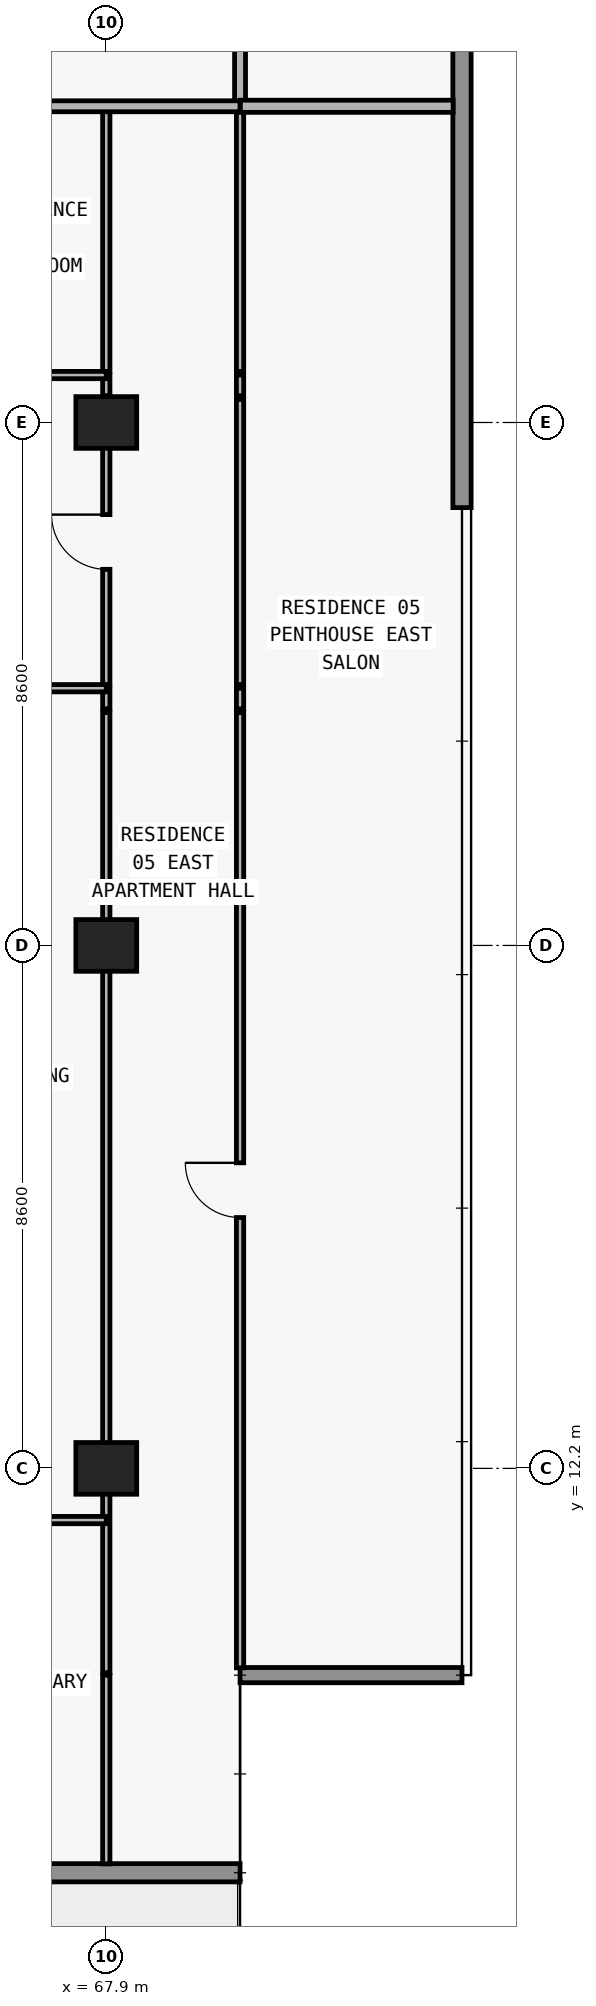
"""IFC4 building model, lengths in metres.
Left out: names, types, materials, properties, quantities, classifications, styles, units other than length and angle.
Written with IfcOpenShell. Run it as: python <this file> out.ifc"""

import sys

from ifc_helpers import new_model, si_unit, direction, frame, frame_2d, origin, origin_2d, place, context, subcontext, project, spatial, rectangle, extrude, element, fill, save


model = new_model("IFC4")
c1 = context("Model", 3, precision=1e-05, world=origin(), true_north=direction((0.0, 1.0)))
c2 = subcontext(c1, "Body", "Model", "MODEL_VIEW")
j1 = project(units=[si_unit("LENGTHUNIT", "METRE"), si_unit("PLANEANGLEUNIT", "RADIAN")], contexts=[c1])
p1 = place(None, origin())
s1 = spatial("IfcSite", under=j1, at=p1, CompositionType="ELEMENT")
p2 = place(p1, origin())
s2 = spatial("IfcBuilding", under=s1, at=p2, CompositionType="ELEMENT")
p3 = place(p2, frame((0.0, 0.0, 102.6)))
s3 = spatial("IfcBuildingStorey", under=s2, at=p3, CompositionType="ELEMENT", Elevation=102.6)
for number, where, z_axis, x_axis in (
    (1, (67.9, 12.2, 0.0), (0.0, 0.0, 1.0), (1.0, 0.0, 0.0)),
    (2, (67.9, 20.8, 0.0), (0.0, 0.0, 1.0), (1.0, 0.0, 0.0)),
    (3, (67.9, 29.4, 0.0), (0.0, 0.0, 1.0), (1.0, 0.0, 0.0)),
):
    element("IfcColumn", number, at=place(p3, frame(where, z_axis=z_axis, x_axis=x_axis)), inside=s3, PredefinedType="COLUMN", context=c2, shape_type="SweptSolid", body=[
        extrude(rectangle(XDim=1.0, YDim=0.85, at=origin_2d()), origin(), (0.0, 0.0, 1.0), 3.05),
    ])
p4 = place(p3, frame((70.1, 5.55, 0.0), z_axis=(0.0, 0.0, 1.0), x_axis=(-1.0, 0.0, 0.0)))
e4 = element("IfcWall", 4, at=p4, inside=s3, PredefinedType="STANDARD", context=c2, shape_type="SweptSolid", body=[
    extrude(rectangle(XDim=62.4, YDim=0.3, at=frame_2d((31.2, 0.0))), origin(), (0.0, 0.0, 1.0), 3.05),
])
p5 = place(p4, frame((57.226, 0.0, 0.0)))
e5 = element("IfcOpeningElement", 5, at=p5, cuts=e4, PredefinedType="OPENING", context=c2, shape_type="SweptSolid", body=[
    extrude(rectangle(XDim=2.0, YDim=2.3, at=frame_2d((1.0, 1.15))), frame((0.0, 0.16, 0.0), z_axis=(0.0, -1.0, 0.0), x_axis=(1.0, 0.0, 0.0)), (0.0, 0.0, 1.0), 0.32),
])
p6 = place(p4, frame((52.926, 0.0, 0.85)))
e6 = element("IfcOpeningElement", 6, at=p6, cuts=e4, PredefinedType="OPENING", context=c2, shape_type="SweptSolid", body=[
    extrude(rectangle(XDim=2.2, YDim=1.55, at=frame_2d((1.1, 0.775))), frame((0.0, 0.16, 0.0), z_axis=(0.0, -1.0, 0.0), x_axis=(1.0, 0.0, 0.0)), (0.0, 0.0, 1.0), 0.32),
])
p7 = place(p4, frame((48.49, 0.0, 0.0)))
e7 = element("IfcOpeningElement", 7, at=p7, cuts=e4, PredefinedType="OPENING", context=c2, shape_type="SweptSolid", body=[
    extrude(rectangle(XDim=2.0, YDim=2.3, at=frame_2d((1.0, 1.15))), frame((0.0, 0.16, 0.0), z_axis=(0.0, -1.0, 0.0), x_axis=(1.0, 0.0, 0.0)), (0.0, 0.0, 1.0), 0.32),
])
p8 = place(p4, frame((44.39, 0.0, 0.85)))
e8 = element("IfcOpeningElement", 8, at=p8, cuts=e4, PredefinedType="OPENING", context=c2, shape_type="SweptSolid", body=[
    extrude(rectangle(XDim=1.8, YDim=1.55, at=frame_2d((0.9, 0.775))), frame((0.0, 0.16, 0.0), z_axis=(0.0, -1.0, 0.0), x_axis=(1.0, 0.0, 0.0)), (0.0, 0.0, 1.0), 0.32),
])
p9 = place(p4, frame((40.49, 0.0, 0.0)))
e9 = element("IfcOpeningElement", 9, at=p9, cuts=e4, PredefinedType="OPENING", context=c2, shape_type="SweptSolid", body=[
    extrude(rectangle(XDim=2.0, YDim=2.3, at=frame_2d((1.0, 1.15))), frame((0.0, 0.16, 0.0), z_axis=(0.0, -1.0, 0.0), x_axis=(1.0, 0.0, 0.0)), (0.0, 0.0, 1.0), 0.32),
])
p10 = place(p4, frame((35.81, 0.0, 0.65)))
e10 = element("IfcOpeningElement", 10, at=p10, cuts=e4, PredefinedType="OPENING", context=c2, shape_type="SweptSolid", body=[
    extrude(rectangle(XDim=2.6, YDim=1.85, at=frame_2d((1.3, 0.925))), frame((0.0, 0.16, 0.0), z_axis=(0.0, -1.0, 0.0), x_axis=(1.0, 0.0, 0.0)), (0.0, 0.0, 1.0), 0.32),
])
p11 = place(p4, frame((30.1, 0.0, 0.85)))
e11 = element("IfcOpeningElement", 11, at=p11, cuts=e4, PredefinedType="OPENING", context=c2, shape_type="SweptSolid", body=[
    extrude(rectangle(XDim=2.2, YDim=1.55, at=frame_2d((1.1, 0.775))), frame((0.0, 0.16, 0.0), z_axis=(0.0, -1.0, 0.0), x_axis=(1.0, 0.0, 0.0)), (0.0, 0.0, 1.0), 0.32),
])
p12 = place(p4, frame((22.1, 0.0, 0.85)))
e12 = element("IfcOpeningElement", 12, at=p12, cuts=e4, PredefinedType="OPENING", context=c2, shape_type="SweptSolid", body=[
    extrude(rectangle(XDim=2.2, YDim=1.55, at=frame_2d((1.1, 0.775))), frame((0.0, 0.16, 0.0), z_axis=(0.0, -1.0, 0.0), x_axis=(1.0, 0.0, 0.0)), (0.0, 0.0, 1.0), 0.32),
])
p13 = place(p4, frame((15.69, 0.0, 0.0)))
e13 = element("IfcOpeningElement", 13, at=p13, cuts=e4, PredefinedType="OPENING", context=c2, shape_type="SweptSolid", body=[
    extrude(rectangle(XDim=2.0, YDim=2.3, at=frame_2d((1.0, 1.15))), frame((0.0, 0.16, 0.0), z_axis=(0.0, -1.0, 0.0), x_axis=(1.0, 0.0, 0.0)), (0.0, 0.0, 1.0), 0.32),
])
p14 = place(p4, frame((11.59, 0.0, 0.85)))
e14 = element("IfcOpeningElement", 14, at=p14, cuts=e4, PredefinedType="OPENING", context=c2, shape_type="SweptSolid", body=[
    extrude(rectangle(XDim=1.8, YDim=1.55, at=frame_2d((0.9, 0.775))), frame((0.0, 0.16, 0.0), z_axis=(0.0, -1.0, 0.0), x_axis=(1.0, 0.0, 0.0)), (0.0, 0.0, 1.0), 0.32),
])
p15 = place(p4, frame((7.626, 0.0, 0.0)))
e15 = element("IfcOpeningElement", 15, at=p15, cuts=e4, PredefinedType="OPENING", context=c2, shape_type="SweptSolid", body=[
    extrude(rectangle(XDim=2.0, YDim=2.3, at=frame_2d((1.0, 1.15))), frame((0.0, 0.16, 0.0), z_axis=(0.0, -1.0, 0.0), x_axis=(1.0, 0.0, 0.0)), (0.0, 0.0, 1.0), 0.32),
])
p16 = place(p4, frame((3.326, 0.0, 0.85)))
e16 = element("IfcOpeningElement", 16, at=p16, cuts=e4, PredefinedType="OPENING", context=c2, shape_type="SweptSolid", body=[
    extrude(rectangle(XDim=2.2, YDim=1.55, at=frame_2d((1.1, 0.775))), frame((0.0, 0.16, 0.0), z_axis=(0.0, -1.0, 0.0), x_axis=(1.0, 0.0, 0.0)), (0.0, 0.0, 1.0), 0.32),
])
p17 = place(p3, frame((70.1, 8.8, 0.0), z_axis=(0.0, 0.0, 1.0), x_axis=(1.0, 0.0, 0.0)))
e17 = element("IfcWall", 17, at=p17, inside=s3, PredefinedType="ELEMENTEDWALL", context=c2, shape_type="SweptSolid", body=[
    extrude(rectangle(XDim=3.65, YDim=0.25, at=frame_2d((1.825, 0.0))), origin(), (0.0, 0.0, 1.0), 3.05),
])
p18 = place(p3, frame((73.75, 47.2, 0.0), z_axis=(0.0, 0.0, 1.0), x_axis=(0.0, -1.0, 0.0)))
e18 = element("IfcWall", 18, at=p18, inside=s3, PredefinedType="STANDARD", context=c2, shape_type="SweptSolid", body=[
    extrude(rectangle(XDim=19.2, YDim=0.3, at=frame_2d((9.6, 0.0))), origin(), (0.0, 0.0, 1.0), 3.05),
])
p19 = place(p3, frame((67.9, 5.695, 0.0), z_axis=(0.0, 0.0, 1.0), x_axis=(0.0, 1.0, 0.0)))
e19 = element("IfcWall", 19, at=p19, inside=s3, PredefinedType="PARTITIONING", context=c2, shape_type="SweptSolid", body=[
    extrude(rectangle(XDim=3.105, YDim=0.12, at=frame_2d((1.552, 0.0))), origin(), (0.0, 0.0, 1.0), 3.05),
])
p20 = place(p3, frame((67.9, 8.84, 0.0), z_axis=(0.0, 0.0, 1.0), x_axis=(0.0, 1.0, 0.0)))
e20 = element("IfcWall", 20, at=p20, inside=s3, PredefinedType="PARTITIONING", context=c2, shape_type="SweptSolid", body=[
    extrude(rectangle(XDim=15.79, YDim=0.12, at=frame_2d((7.895, 0.0))), origin(), (0.0, 0.0, 1.0), 2.174),
])
p21 = place(p3, frame((67.9, 24.69, 0.0), z_axis=(0.0, 0.0, 1.0), x_axis=(0.0, 1.0, 0.0)))
e21 = element("IfcWall", 21, at=p21, inside=s3, PredefinedType="PARTITIONING", context=c2, shape_type="SweptSolid", body=[
    extrude(rectangle(XDim=0.34, YDim=0.12, at=frame_2d((0.17, 0.0))), origin(), (0.0, 0.0, 1.0), 2.174),
])
p22 = place(p3, frame((67.9, 25.09, 0.0), z_axis=(0.0, 0.0, 1.0), x_axis=(0.0, 1.0, 0.0)))
e22 = element("IfcWall", 22, at=p22, inside=s3, PredefinedType="PARTITIONING", context=c2, shape_type="SweptSolid", body=[
    extrude(rectangle(XDim=4.69, YDim=0.12, at=frame_2d((2.345, 0.0))), origin(), (0.0, 0.0, 1.0), 2.174),
])
p23 = place(p22, frame((1.895, 0.0, 0.0)))
e23 = element("IfcOpeningElement", 23, at=p23, cuts=e22, PredefinedType="OPENING", context=c2, shape_type="SweptSolid", body=[
    extrude(rectangle(XDim=0.9, YDim=2.124, at=frame_2d((0.45, 1.062))), frame((0.0, 0.07, 0.0), z_axis=(0.0, -1.0, 0.0), x_axis=(1.0, 0.0, 0.0)), (0.0, 0.0, 1.0), 0.14),
])
p24 = place(p3, frame((67.9, 29.84, 0.0), z_axis=(0.0, 0.0, 1.0), x_axis=(0.0, 1.0, 0.0)))
e24 = element("IfcWall", 24, at=p24, inside=s3, PredefinedType="PARTITIONING", context=c2, shape_type="SweptSolid", body=[
    extrude(rectangle(XDim=0.34, YDim=0.12, at=frame_2d((0.17, 0.0))), origin(), (0.0, 0.0, 1.0), 2.174),
])
p25 = place(p3, frame((67.9, 30.24, 0.0), z_axis=(0.0, 0.0, 1.0), x_axis=(0.0, 1.0, 0.0)))
e25 = element("IfcWall", 25, at=p25, inside=s3, PredefinedType="PARTITIONING", context=c2, shape_type="SweptSolid", body=[
    extrude(rectangle(XDim=4.36, YDim=0.12, at=frame_2d((2.18, 0.0))), origin(), (0.0, 0.0, 1.0), 2.174),
])
p26 = place(p3, frame((70.1, 8.92, 0.0), z_axis=(0.0, 0.0, 1.0), x_axis=(0.0, 1.0, 0.0)))
e26 = element("IfcWall", 26, at=p26, inside=s3, PredefinedType="PARTITIONING", context=c2, shape_type="SweptSolid", body=[
    extrude(rectangle(XDim=15.71, YDim=0.12, at=frame_2d((7.855, 0.0))), origin(), (0.0, 0.0, 1.0), 3.05),
])
p27 = place(p26, frame((7.405, 0.0, 0.0)))
e27 = element("IfcOpeningElement", 27, at=p27, cuts=e26, PredefinedType="OPENING", context=c2, shape_type="SweptSolid", body=[
    extrude(rectangle(XDim=0.9, YDim=2.15, at=frame_2d((0.45, 1.075))), frame((0.0, 0.07, 0.0), z_axis=(0.0, -1.0, 0.0), x_axis=(1.0, 0.0, 0.0)), (0.0, 0.0, 1.0), 0.14),
])
p28 = place(p3, frame((70.1, 24.69, 0.0), z_axis=(0.0, 0.0, 1.0), x_axis=(0.0, 1.0, 0.0)))
e28 = element("IfcWall", 28, at=p28, inside=s3, PredefinedType="PARTITIONING", context=c2, shape_type="SweptSolid", body=[
    extrude(rectangle(XDim=0.34, YDim=0.12, at=frame_2d((0.17, 0.0))), origin(), (0.0, 0.0, 1.0), 3.05),
])
p29 = place(p3, frame((70.1, 25.09, 0.0), z_axis=(0.0, 0.0, 1.0), x_axis=(0.0, 1.0, 0.0)))
e29 = element("IfcWall", 29, at=p29, inside=s3, PredefinedType="PARTITIONING", context=c2, shape_type="SweptSolid", body=[
    extrude(rectangle(XDim=4.69, YDim=0.12, at=frame_2d((2.345, 0.0))), origin(), (0.0, 0.0, 1.0), 3.05),
])
p30 = place(p3, frame((70.1, 29.84, 0.0), z_axis=(0.0, 0.0, 1.0), x_axis=(0.0, 1.0, 0.0)))
e30 = element("IfcWall", 30, at=p30, inside=s3, PredefinedType="PARTITIONING", context=c2, shape_type="SweptSolid", body=[
    extrude(rectangle(XDim=0.34, YDim=0.12, at=frame_2d((0.17, 0.0))), origin(), (0.0, 0.0, 1.0), 3.05),
])
p31 = place(p3, frame((70.1, 30.24, 0.0), z_axis=(0.0, 0.0, 1.0), x_axis=(0.0, 1.0, 0.0)))
e31 = element("IfcWall", 31, at=p31, inside=s3, PredefinedType="PARTITIONING", context=c2, shape_type="SweptSolid", body=[
    extrude(rectangle(XDim=4.36, YDim=0.12, at=frame_2d((2.18, 0.0))), origin(), (0.0, 0.0, 1.0), 3.05),
])
p32 = place(p3, frame((70.1, 34.605, 0.0), z_axis=(0.0, 0.0, 1.0), x_axis=(0.0, 1.0, 0.0)))
e32 = element("IfcWall", 32, at=p32, inside=s3, PredefinedType="PARTITIONING", context=c2, shape_type="SweptSolid", body=[
    extrude(rectangle(XDim=2.345, YDim=0.18, at=frame_2d((1.172, 0.0))), origin(), (0.0, 0.0, 1.0), 3.05),
])
p33 = place(p3, frame((63.448, 11.35, 0.0), z_axis=(0.0, 0.0, 1.0), x_axis=(1.0, 0.0, 0.0)))
e33 = element("IfcWall", 33, at=p33, inside=s3, PredefinedType="PARTITIONING", context=c2, shape_type="SweptSolid", body=[
    extrude(rectangle(XDim=4.452, YDim=0.12, at=frame_2d((2.226, 0.0))), origin(), (0.0, 0.0, 1.0), 3.05),
])
p34 = place(p33, frame((1.776, 0.0, 0.0)))
e34 = element("IfcOpeningElement", 34, at=p34, cuts=e33, PredefinedType="OPENING", context=c2, shape_type="SweptSolid", body=[
    extrude(rectangle(XDim=0.9, YDim=2.15, at=frame_2d((0.45, 1.075))), frame((0.0, 0.07, 0.0), z_axis=(0.0, -1.0, 0.0), x_axis=(1.0, 0.0, 0.0)), (0.0, 0.0, 1.0), 0.14),
])
p35 = place(p3, frame((59.55, 25.03, 0.0), z_axis=(0.0, 0.0, 1.0), x_axis=(1.0, 0.0, 0.0)))
e35 = element("IfcWall", 35, at=p35, inside=s3, PredefinedType="PARTITIONING", context=c2, shape_type="SweptSolid", body=[
    extrude(rectangle(XDim=8.35, YDim=0.12, at=frame_2d((4.175, 0.0))), origin(), (0.0, 0.0, 1.0), 3.05),
])
p36 = place(p35, frame((1.499, 0.0, 0.0)))
e36 = element("IfcOpeningElement", 36, at=p36, cuts=e35, PredefinedType="OPENING", context=c2, shape_type="SweptSolid", body=[
    extrude(rectangle(XDim=0.9, YDim=2.15, at=frame_2d((0.45, 1.075))), frame((0.0, 0.07, 0.0), z_axis=(0.0, -1.0, 0.0), x_axis=(1.0, 0.0, 0.0)), (0.0, 0.0, 1.0), 0.14),
])
p37 = place(p35, frame((5.968, 0.0, 0.0)))
e37 = element("IfcOpeningElement", 37, at=p37, cuts=e35, PredefinedType="OPENING", context=c2, shape_type="SweptSolid", body=[
    extrude(rectangle(XDim=0.9, YDim=2.15, at=frame_2d((0.45, 1.075))), frame((0.0, 0.07, 0.0), z_axis=(0.0, -1.0, 0.0), x_axis=(1.0, 0.0, 0.0)), (0.0, 0.0, 1.0), 0.14),
])
p38 = place(p3, frame((59.55, 30.18, 0.0), z_axis=(0.0, 0.0, 1.0), x_axis=(1.0, 0.0, 0.0)))
e38 = element("IfcWall", 38, at=p38, inside=s3, PredefinedType="PARTITIONING", context=c2, shape_type="SweptSolid", body=[
    extrude(rectangle(XDim=8.35, YDim=0.12, at=frame_2d((4.175, 0.0))), origin(), (0.0, 0.0, 1.0), 3.05),
])
p39 = place(p38, frame((1.793, 0.0, 0.0)))
e39 = element("IfcOpeningElement", 39, at=p39, cuts=e38, PredefinedType="OPENING", context=c2, shape_type="SweptSolid", body=[
    extrude(rectangle(XDim=0.9, YDim=2.15, at=frame_2d((0.45, 1.075))), frame((0.0, 0.07, 0.0), z_axis=(0.0, -1.0, 0.0), x_axis=(1.0, 0.0, 0.0)), (0.0, 0.0, 1.0), 0.14),
])
p40 = place(p3, frame((59.55, 34.6, 0.0), z_axis=(0.0, 0.0, 1.0), x_axis=(1.0, 0.0, 0.0)))
e40 = element("IfcWall", 40, at=p40, inside=s3, PredefinedType="PARTITIONING", context=c2, shape_type="SweptSolid", body=[
    extrude(rectangle(XDim=10.55, YDim=0.18, at=frame_2d((5.275, 0.0))), origin(), (0.0, 0.0, 1.0), 3.05),
])
p41 = place(p40, frame((2.51, 0.0, 0.0)))
e41 = element("IfcOpeningElement", 41, at=p41, cuts=e40, PredefinedType="OPENING", context=c2, shape_type="SweptSolid", body=[
    extrude(rectangle(XDim=1.0, YDim=2.2, at=frame_2d((0.5, 1.1))), frame((0.0, 0.1, 0.0), z_axis=(0.0, -1.0, 0.0), x_axis=(1.0, 0.0, 0.0)), (0.0, 0.0, 1.0), 0.2),
])
p42 = place(p3, frame((70.105, 34.6, 0.0), z_axis=(0.0, 0.0, 1.0), x_axis=(1.0, 0.0, 0.0)))
e42 = element("IfcWall", 42, at=p42, inside=s3, PredefinedType="PARTITIONING", context=c2, shape_type="SweptSolid", body=[
    extrude(rectangle(XDim=3.5, YDim=0.2, at=frame_2d((1.75, 0.0))), origin(), (0.0, 0.0, 1.0), 3.05),
])
p43 = place(p23, origin())
e43 = element("IfcDoor", 43, at=p43, inside=s3, OperationType="SINGLE_SWING_RIGHT", PredefinedType="DOOR", context=c2, shape_type="SweptSolid", body=[
    extrude(rectangle(XDim=0.9, YDim=2.124, at=frame_2d((0.45, 1.062))), frame((0.0, 0.025, 0.0), z_axis=(0.0, -1.0, 0.0), x_axis=(1.0, 0.0, 0.0)), (0.0, 0.0, 1.0), 0.05),
])
fill(e23, e43)
p44 = place(p27, origin())
e44 = element("IfcDoor", 44, at=p44, inside=s3, OperationType="SINGLE_SWING_RIGHT", PredefinedType="DOOR", context=c2, shape_type="SweptSolid", body=[
    extrude(rectangle(XDim=0.9, YDim=2.15, at=frame_2d((0.45, 1.075))), frame((0.0, 0.025, 0.0), z_axis=(0.0, -1.0, 0.0), x_axis=(1.0, 0.0, 0.0)), (0.0, 0.0, 1.0), 0.05),
])
fill(e27, e44)
save(model, sys.argv[1])
